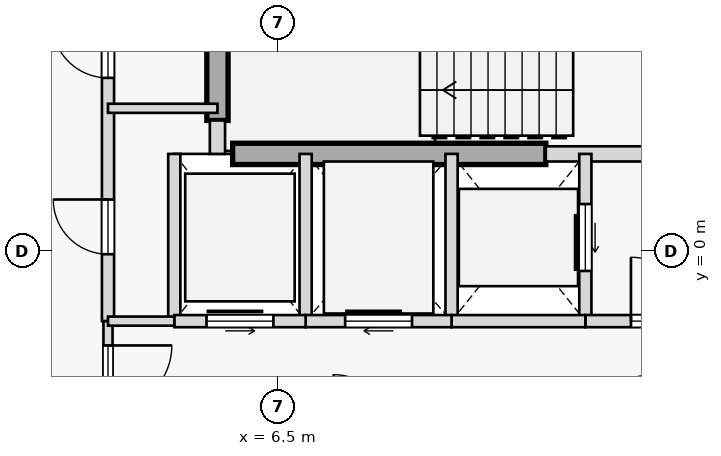
"""IFC4 building model, lengths in metres.
Left out: names, types, materials, properties, quantities, classifications, styles, units other than length and angle.
Written with IfcOpenShell. Run it as: python <this file> out.ifc"""

import sys

from ifc_helpers import new_model, si_unit, direction, frame, frame_2d, origin, place, context, subcontext, project, spatial, rectangle, extrude, element, fill, save


model = new_model("IFC4")
c1 = context("Model", 3, precision=1e-05, world=origin(), true_north=direction((0.0, 1.0)))
c2 = subcontext(c1, "Body", "Model", "MODEL_VIEW")
j1 = project(units=[si_unit("LENGTHUNIT", "METRE"), si_unit("PLANEANGLEUNIT", "RADIAN")], contexts=[c1])
p1 = place(None, origin())
s1 = spatial("IfcSite", under=j1, at=p1, CompositionType="ELEMENT")
p2 = place(p1, origin())
s2 = spatial("IfcBuilding", under=s1, at=p2, CompositionType="ELEMENT")
p3 = place(p2, frame((0.0, 0.0, 227.65)))
s3 = spatial("IfcBuildingStorey", under=s2, at=p3, CompositionType="ELEMENT", Elevation=227.65)
p4 = place(p3, frame((5.5, 2.15, 0.0), z_axis=(0.0, 0.0, 1.0), x_axis=(0.0, 1.0, 0.0)))
e1 = element("IfcWall", 1, at=p4, inside=s3, PredefinedType="SHEAR", context=c2, shape_type="SweptSolid", body=[
    extrude(rectangle(XDim=3.275, YDim=0.35, at=frame_2d((1.638, 0.0))), origin(), (0.0, 0.0, 1.0), 3.125),
])
p5 = place(p3, frame((5.75, 1.6, 0.0), z_axis=(0.0, 0.0, 1.0), x_axis=(1.0, 0.0, 0.0)))
e2 = element("IfcWall", 2, at=p5, inside=s3, PredefinedType="SHEAR", context=c2, shape_type="SweptSolid", body=[
    extrude(rectangle(XDim=5.15, YDim=0.35, at=frame_2d((2.575, 0.0))), origin(), (0.0, 0.0, 1.0), 3.125),
])
p6 = place(p3, frame((10.9, 1.6, 0.0), z_axis=(0.0, 0.0, 1.0), x_axis=(1.0, 0.0, 0.0)))
e3 = element("IfcWall", 3, at=p6, inside=s3, PredefinedType="STANDARD", context=c2, shape_type="SweptSolid", body=[
    extrude(rectangle(XDim=3.6, YDim=0.25, at=frame_2d((1.8, 0.0))), origin(), (0.0, 0.0, 1.0), 3.125),
])
p7 = place(p6, frame((1.62, 0.0, 0.0)))
e4 = element("IfcOpeningElement", 4, at=p7, cuts=e3, PredefinedType="OPENING", context=c2, shape_type="SweptSolid", body=[
    extrude(rectangle(XDim=1.05, YDim=2.15, at=frame_2d((0.525, 1.075))), frame((0.0, 0.135, 0.0), z_axis=(0.0, -1.0, 0.0), x_axis=(1.0, 0.0, 0.0)), (0.0, 0.0, 1.0), 0.27),
])
p8 = place(p3, frame((5.5, 1.6, 0.0), z_axis=(0.0, 0.0, 1.0), x_axis=(0.0, 1.0, 0.0)))
e5 = element("IfcWall", 5, at=p8, inside=s3, PredefinedType="STANDARD", context=c2, shape_type="SweptSolid", body=[
    extrude(rectangle(XDim=0.55, YDim=0.25, at=frame_2d((0.275, 0.0))), origin(), (0.0, 0.0, 1.0), 3.125),
])
p9 = place(p3, frame((3.7, -1.15, 0.0), z_axis=(0.0, 0.0, 1.0), x_axis=(0.0, 1.0, 0.0)))
e6 = element("IfcWall", 6, at=p9, inside=s3, PredefinedType="STANDARD", context=c2, shape_type="SweptSolid", body=[
    extrude(rectangle(XDim=6.75, YDim=0.2, at=frame_2d((3.375, 0.0))), origin(), (0.0, 0.0, 1.0), 3.125),
])
p10 = place(p9, frame((1.1, 0.0, 0.0)))
e7 = element("IfcOpeningElement", 7, at=p10, cuts=e6, PredefinedType="OPENING", context=c2, shape_type="SweptSolid", body=[
    extrude(rectangle(XDim=0.9, YDim=2.15, at=frame_2d((0.45, 1.075))), frame((0.0, 0.11, 0.0), z_axis=(0.0, -1.0, 0.0), x_axis=(1.0, 0.0, 0.0)), (0.0, 0.0, 1.0), 0.22),
])
p11 = place(p9, frame((4.0, 0.0, 0.0)))
e8 = element("IfcOpeningElement", 8, at=p11, cuts=e6, PredefinedType="OPENING", context=c2, shape_type="SweptSolid", body=[
    extrude(rectangle(XDim=0.92, YDim=2.15, at=frame_2d((0.46, 1.075))), frame((0.0, 0.11, 0.0), z_axis=(0.0, -1.0, 0.0), x_axis=(1.0, 0.0, 0.0)), (0.0, 0.0, 1.0), 0.22),
])
p12 = place(p3, frame((3.7, -2.95, 0.0), z_axis=(0.0, 0.0, 1.0), x_axis=(0.0, 1.0, 0.0)))
e9 = element("IfcWall", 9, at=p12, inside=s3, PredefinedType="PARTITIONING", context=c2, shape_type="SweptSolid", body=[
    extrude(rectangle(XDim=1.8, YDim=0.15, at=frame_2d((0.9, 0.0))), origin(), (0.0, 0.0, 1.0), 3.125),
])
p13 = place(p12, frame((0.35, 0.0, 0.0)))
e10 = element("IfcOpeningElement", 10, at=p13, cuts=e9, PredefinedType="OPENING", context=c2, shape_type="SweptSolid", body=[
    extrude(rectangle(XDim=1.05, YDim=2.18, at=frame_2d((0.525, 1.09))), frame((0.0, 0.085, 0.0), z_axis=(0.0, -1.0, 0.0), x_axis=(1.0, 0.0, 0.0)), (0.0, 0.0, 1.0), 0.17),
])
p14 = place(p3, frame((11.55, -1.15, 0.0), z_axis=(0.0, 0.0, 1.0), x_axis=(0.0, 1.0, 0.0)))
e11 = element("IfcWall", 11, at=p14, inside=s3, PredefinedType="STANDARD", context=c2, shape_type="SweptSolid", body=[
    extrude(rectangle(XDim=2.75, YDim=0.2, at=frame_2d((1.375, 0.0))), origin(), (0.0, 0.0, 1.0), 3.125),
])
p15 = place(p14, frame((0.825, 0.0, 0.0)))
e12 = element("IfcOpeningElement", 12, at=p15, cuts=e11, PredefinedType="OPENING", context=c2, shape_type="SweptSolid", body=[
    extrude(rectangle(XDim=1.1, YDim=2.15, at=frame_2d((0.55, 1.075))), frame((0.0, 0.11, 0.0), z_axis=(0.0, -1.0, 0.0), x_axis=(1.0, 0.0, 0.0)), (0.0, 0.0, 1.0), 0.22),
])
p16 = place(p3, frame((9.35, -1.15, 0.0), z_axis=(0.0, 0.0, 1.0), x_axis=(0.0, 1.0, 0.0)))
e13 = element("IfcWall", 13, at=p16, inside=s3, PredefinedType="STANDARD", context=c2, shape_type="SweptSolid", body=[
    extrude(rectangle(XDim=2.75, YDim=0.2, at=frame_2d((1.375, 0.0))), origin(), (0.0, 0.0, 1.0), 3.125),
])
p17 = place(p3, frame((11.55, -1.15, 0.0), z_axis=(0.0, 0.0, 1.0), x_axis=(1.0, 0.0, 0.0)))
e14 = element("IfcWall", 14, at=p17, inside=s3, PredefinedType="STANDARD", context=c2, shape_type="SweptSolid", body=[
    extrude(rectangle(XDim=2.95, YDim=0.2, at=frame_2d((1.475, 0.0))), origin(), (0.0, 0.0, 1.0), 3.125),
])
p18 = place(p17, frame((0.75, 0.0, 0.0)))
e15 = element("IfcOpeningElement", 15, at=p18, cuts=e14, PredefinedType="OPENING", context=c2, shape_type="SweptSolid", body=[
    extrude(rectangle(XDim=1.05, YDim=2.18, at=frame_2d((0.525, 1.09))), frame((0.0, 0.11, 0.0), z_axis=(0.0, -1.0, 0.0), x_axis=(1.0, 0.0, 0.0)), (0.0, 0.0, 1.0), 0.22),
])
p19 = place(p3, frame((9.35, -1.15, 0.0), z_axis=(0.0, 0.0, 1.0), x_axis=(1.0, 0.0, 0.0)))
e16 = element("IfcWall", 16, at=p19, inside=s3, PredefinedType="STANDARD", context=c2, shape_type="SweptSolid", body=[
    extrude(rectangle(XDim=2.2, YDim=0.2, at=frame_2d((1.1, 0.0))), origin(), (0.0, 0.0, 1.0), 3.125),
])
p20 = place(p3, frame((6.95, -1.15, 0.0), z_axis=(0.0, 0.0, 1.0), x_axis=(0.0, 1.0, 0.0)))
e17 = element("IfcWall", 17, at=p20, inside=s3, PredefinedType="STANDARD", context=c2, shape_type="SweptSolid", body=[
    extrude(rectangle(XDim=2.75, YDim=0.2, at=frame_2d((1.375, 0.0))), origin(), (0.0, 0.0, 1.0), 3.125),
])
p21 = place(p3, frame((6.95, -1.15, 0.0), z_axis=(0.0, 0.0, 1.0), x_axis=(1.0, 0.0, 0.0)))
e18 = element("IfcWall", 18, at=p21, inside=s3, PredefinedType="STANDARD", context=c2, shape_type="SweptSolid", body=[
    extrude(rectangle(XDim=2.4, YDim=0.2, at=frame_2d((1.2, 0.0))), origin(), (0.0, 0.0, 1.0), 3.125),
])
p22 = place(p21, frame((0.65, 0.0, 0.0)))
e19 = element("IfcOpeningElement", 19, at=p22, cuts=e18, PredefinedType="OPENING", context=c2, shape_type="SweptSolid", body=[
    extrude(rectangle(XDim=1.1, YDim=2.15, at=frame_2d((0.55, 1.075))), frame((0.0, 0.11, 0.0), z_axis=(0.0, -1.0, 0.0), x_axis=(1.0, 0.0, 0.0)), (0.0, 0.0, 1.0), 0.22),
])
p23 = place(p3, frame((4.79, -1.15, 0.0), z_axis=(0.0, 0.0, 1.0), x_axis=(0.0, 1.0, 0.0)))
e20 = element("IfcWall", 20, at=p23, inside=s3, PredefinedType="STANDARD", context=c2, shape_type="SweptSolid", body=[
    extrude(rectangle(XDim=2.75, YDim=0.2, at=frame_2d((1.375, 0.0))), origin(), (0.0, 0.0, 1.0), 3.125),
])
p24 = place(p3, frame((4.79, -1.15, 0.0), z_axis=(0.0, 0.0, 1.0), x_axis=(1.0, 0.0, 0.0)))
e21 = element("IfcWall", 21, at=p24, inside=s3, PredefinedType="STANDARD", context=c2, shape_type="SweptSolid", body=[
    extrude(rectangle(XDim=2.16, YDim=0.2, at=frame_2d((1.08, 0.0))), origin(), (0.0, 0.0, 1.0), 3.125),
])
p25 = place(p24, frame((0.53, 0.0, 0.0)))
e22 = element("IfcOpeningElement", 22, at=p25, cuts=e21, PredefinedType="OPENING", context=c2, shape_type="SweptSolid", body=[
    extrude(rectangle(XDim=1.1, YDim=2.15, at=frame_2d((0.55, 1.075))), frame((0.0, 0.11, 0.0), z_axis=(0.0, -1.0, 0.0), x_axis=(1.0, 0.0, 0.0)), (0.0, 0.0, 1.0), 0.22),
])
p26 = place(p3, frame((3.7, -1.15, 0.0), z_axis=(0.0, 0.0, 1.0), x_axis=(1.0, 0.0, 0.0)))
e23 = element("IfcWall", 23, at=p26, inside=s3, PredefinedType="PARTITIONING", context=c2, shape_type="SweptSolid", body=[
    extrude(rectangle(XDim=1.09, YDim=0.15, at=frame_2d((0.545, 0.0))), origin(), (0.0, 0.0, 1.0), 3.125),
])
p27 = place(p3, frame((3.7, 2.35, 0.0), z_axis=(0.0, 0.0, 1.0), x_axis=(1.0, 0.0, 0.0)))
e24 = element("IfcWall", 24, at=p27, inside=s3, PredefinedType="PARTITIONING", context=c2, shape_type="SweptSolid", body=[
    extrude(rectangle(XDim=1.8, YDim=0.15, at=frame_2d((0.9, 0.0))), origin(), (0.0, 0.0, 1.0), 3.125),
])
p28 = place(p18, origin())
e25 = element("IfcDoor", 25, at=p28, inside=s3, OperationType="SINGLE_SWING_LEFT", PredefinedType="DOOR", context=c2, shape_type="SweptSolid", body=[
    extrude(rectangle(XDim=1.05, YDim=2.18, at=frame_2d((0.525, 1.09))), frame((0.0, 0.025, 0.0), z_axis=(0.0, -1.0, 0.0), x_axis=(1.0, 0.0, 0.0)), (0.0, 0.0, 1.0), 0.05),
])
fill(e15, e25)
p29 = place(p13, frame((1.05, 0.0, 0.0), z_axis=(0.0, 0.0, 1.0), x_axis=(-1.0, 0.0, 0.0)))
e26 = element("IfcDoor", 26, at=p29, inside=s3, OperationType="SINGLE_SWING_RIGHT", PredefinedType="DOOR", context=c2, shape_type="SweptSolid", body=[
    extrude(rectangle(XDim=1.05, YDim=2.18, at=frame_2d((0.525, 1.09))), frame((0.0, 0.025, 0.0), z_axis=(0.0, -1.0, 0.0), x_axis=(1.0, 0.0, 0.0)), (0.0, 0.0, 1.0), 0.05),
])
fill(e10, e26)
p30 = place(p15, origin())
e27 = element("IfcDoor", 27, at=p30, inside=s3, OperationType="SLIDING_TO_RIGHT", PredefinedType="DOOR", context=c2, shape_type="SweptSolid", body=[
    extrude(rectangle(XDim=1.1, YDim=2.15, at=frame_2d((0.55, 1.075))), frame((0.0, 0.025, 0.0), z_axis=(0.0, -1.0, 0.0), x_axis=(1.0, 0.0, 0.0)), (0.0, 0.0, 1.0), 0.05),
])
fill(e12, e27)
p31 = place(p22, origin())
e28 = element("IfcDoor", 28, at=p31, inside=s3, OperationType="SLIDING_TO_RIGHT", PredefinedType="DOOR", context=c2, shape_type="SweptSolid", body=[
    extrude(rectangle(XDim=1.1, YDim=2.15, at=frame_2d((0.55, 1.075))), frame((0.0, 0.025, 0.0), z_axis=(0.0, -1.0, 0.0), x_axis=(1.0, 0.0, 0.0)), (0.0, 0.0, 1.0), 0.05),
])
fill(e19, e28)
p32 = place(p25, origin())
e29 = element("IfcDoor", 29, at=p32, inside=s3, OperationType="SLIDING_TO_LEFT", PredefinedType="DOOR", context=c2, shape_type="SweptSolid", body=[
    extrude(rectangle(XDim=1.1, YDim=2.15, at=frame_2d((0.55, 1.075))), frame((0.0, 0.025, 0.0), z_axis=(0.0, -1.0, 0.0), x_axis=(1.0, 0.0, 0.0)), (0.0, 0.0, 1.0), 0.05),
])
fill(e22, e29)
p33 = place(p10, origin())
e30 = element("IfcDoor", 30, at=p33, inside=s3, OperationType="SINGLE_SWING_RIGHT", PredefinedType="DOOR", context=c2, shape_type="SweptSolid", body=[
    extrude(rectangle(XDim=0.9, YDim=2.15, at=frame_2d((0.45, 1.075))), frame((0.0, 0.025, 0.0), z_axis=(0.0, -1.0, 0.0), x_axis=(1.0, 0.0, 0.0)), (0.0, 0.0, 1.0), 0.05),
])
fill(e7, e30)
p34 = place(p11, origin())
e31 = element("IfcDoor", 31, at=p34, inside=s3, OperationType="SINGLE_SWING_RIGHT", PredefinedType="DOOR", context=c2, shape_type="SweptSolid", body=[
    extrude(rectangle(XDim=0.92, YDim=2.15, at=frame_2d((0.46, 1.075))), frame((0.0, 0.025, 0.0), z_axis=(0.0, -1.0, 0.0), x_axis=(1.0, 0.0, 0.0)), (0.0, 0.0, 1.0), 0.05),
])
fill(e8, e31)
save(model, sys.argv[1])
